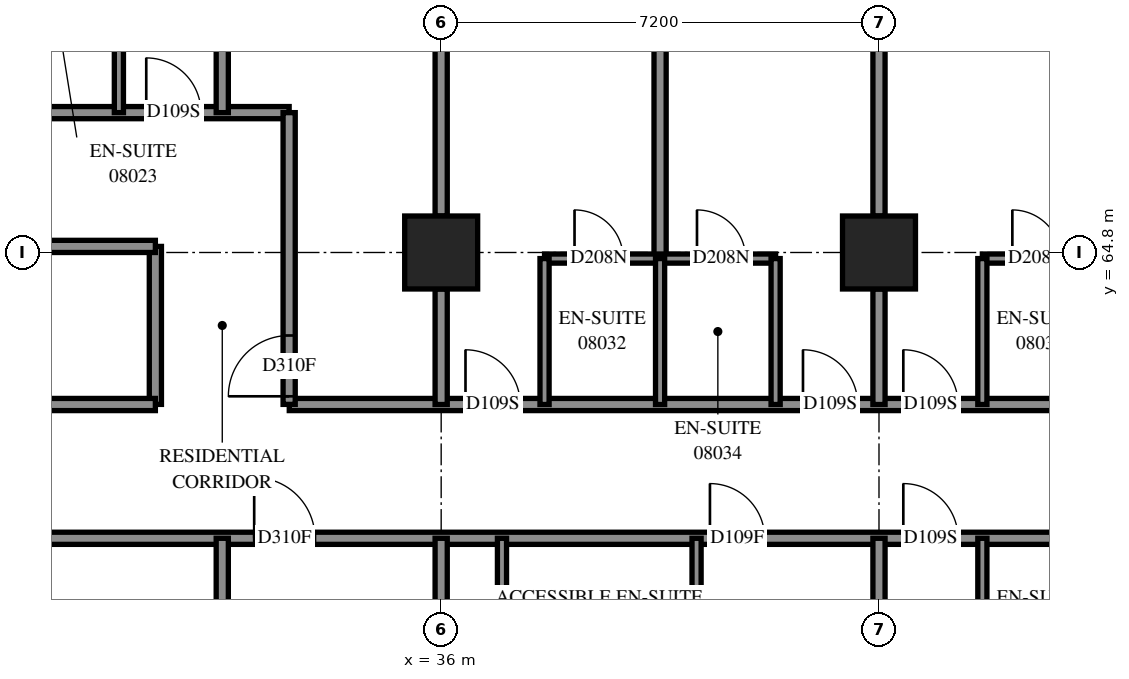
"""IFC4 building model, lengths in metres.
Left out: names, types, materials, properties, quantities, classifications, styles, units other than length and angle.
Written with IfcOpenShell. Run it as: python <this file> out.ifc"""

import sys

from ifc_helpers import new_model, si_unit, direction, frame, frame_2d, origin, origin_2d, place, context, subcontext, project, spatial, rectangle, extrude, element, fill, save


model = new_model("IFC4")
c1 = context("Model", 3, precision=1e-05, world=origin(), true_north=direction((0.0, 1.0)))
c2 = subcontext(c1, "Body", "Model", "MODEL_VIEW")
j1 = project(units=[si_unit("LENGTHUNIT", "METRE"), si_unit("PLANEANGLEUNIT", "RADIAN")], contexts=[c1])
p1 = place(None, origin())
s1 = spatial("IfcSite", under=j1, at=p1, CompositionType="ELEMENT")
p2 = place(p1, origin())
s2 = spatial("IfcBuilding", under=s1, at=p2, CompositionType="ELEMENT")
p3 = place(p2, frame((0.0, 0.0, 33.8)))
s3 = spatial("IfcBuildingStorey", under=s2, at=p3, CompositionType="ELEMENT", Elevation=33.8)
for number, where, z_axis, x_axis in (
    (1, (36.0, 64.8, 0.0), (0.0, 0.0, 1.0), (1.0, 0.0, 0.0)),
    (2, (43.2, 64.8, 0.0), (0.0, 0.0, 1.0), (1.0, 0.0, 0.0)),
):
    element("IfcColumn", number, at=place(p3, frame(where, z_axis=z_axis, x_axis=x_axis)), inside=s3, PredefinedType="COLUMN", context=c2, shape_type="SweptSolid", body=[
        extrude(rectangle(XDim=1.2, YDim=1.2, at=origin_2d()), origin(), (0.0, 0.0, 1.0), 3.1),
    ])
p4 = place(p3, frame((28.8, 60.1, 0.0), z_axis=(0.0, 0.0, 1.0), x_axis=(1.0, 0.0, 0.0)))
e3 = element("IfcWall", 3, at=p4, inside=s3, PredefinedType="PARTITIONING", context=c2, shape_type="SweptSolid", body=[
    extrude(rectangle(XDim=24.1, YDim=0.2, at=frame_2d((12.05, 0.0))), origin(), (0.0, 0.0, 1.0), 3.1),
])
p5 = place(p4, frame((4.125, 0.0, 0.0)))
e4 = element("IfcOpeningElement", 4, at=p5, cuts=e3, PredefinedType="OPENING", context=c2, shape_type="SweptSolid", body=[
    extrude(rectangle(XDim=1.0, YDim=2.1, at=frame_2d((0.5, 1.05))), frame((0.0, 0.11, 0.0), z_axis=(0.0, -1.0, 0.0), x_axis=(1.0, 0.0, 0.0)), (0.0, 0.0, 1.0), 0.22),
])
p6 = place(p4, frame((11.62, 0.0, 0.0)))
e5 = element("IfcOpeningElement", 5, at=p6, cuts=e3, PredefinedType="OPENING", context=c2, shape_type="SweptSolid", body=[
    extrude(rectangle(XDim=0.9, YDim=2.1, at=frame_2d((0.45, 1.05))), frame((0.0, 0.11, 0.0), z_axis=(0.0, -1.0, 0.0), x_axis=(1.0, 0.0, 0.0)), (0.0, 0.0, 1.0), 0.22),
])
p7 = place(p4, frame((14.8, 0.0, 0.0)))
e6 = element("IfcOpeningElement", 6, at=p7, cuts=e3, PredefinedType="OPENING", context=c2, shape_type="SweptSolid", body=[
    extrude(rectangle(XDim=0.9, YDim=2.1, at=frame_2d((0.45, 1.05))), frame((0.0, 0.11, 0.0), z_axis=(0.0, -1.0, 0.0), x_axis=(1.0, 0.0, 0.0)), (0.0, 0.0, 1.0), 0.22),
])
p8 = place(p4, frame((18.835, 0.0, 0.0)))
e7 = element("IfcOpeningElement", 7, at=p8, cuts=e3, PredefinedType="OPENING", context=c2, shape_type="SweptSolid", body=[
    extrude(rectangle(XDim=1.0, YDim=2.1, at=frame_2d((0.5, 1.05))), frame((0.0, 0.11, 0.0), z_axis=(0.0, -1.0, 0.0), x_axis=(1.0, 0.0, 0.0)), (0.0, 0.0, 1.0), 0.22),
])
p9 = place(p4, frame((22.854, 0.0, 0.0)))
e8 = element("IfcOpeningElement", 8, at=p9, cuts=e3, PredefinedType="OPENING", context=c2, shape_type="SweptSolid", body=[
    extrude(rectangle(XDim=1.0, YDim=2.1, at=frame_2d((0.5, 1.05))), frame((0.0, 0.11, 0.0), z_axis=(0.0, -1.0, 0.0), x_axis=(1.0, 0.0, 0.0)), (0.0, 0.0, 1.0), 0.22),
])
p10 = place(p3, frame((33.502, 62.3, 0.0), z_axis=(0.0, 0.0, 1.0), x_axis=(1.0, 0.0, 0.0)))
e9 = element("IfcWall", 9, at=p10, inside=s3, PredefinedType="PARTITIONING", context=c2, shape_type="SweptSolid", body=[
    extrude(rectangle(XDim=20.998, YDim=0.2, at=frame_2d((10.499, 0.0))), origin(), (0.0, 0.0, 1.0), 3.1),
])
p11 = place(p10, frame((2.898, 0.0, 0.0)))
e10 = element("IfcOpeningElement", 10, at=p11, cuts=e9, PredefinedType="OPENING", context=c2, shape_type="SweptSolid", body=[
    extrude(rectangle(XDim=0.9, YDim=2.1, at=frame_2d((0.45, 1.05))), frame((0.0, 0.11, 0.0), z_axis=(0.0, -1.0, 0.0), x_axis=(1.0, 0.0, 0.0)), (0.0, 0.0, 1.0), 0.22),
])
p12 = place(p10, frame((8.448, 0.0, 0.0)))
e11 = element("IfcOpeningElement", 11, at=p12, cuts=e9, PredefinedType="OPENING", context=c2, shape_type="SweptSolid", body=[
    extrude(rectangle(XDim=0.9, YDim=2.1, at=frame_2d((0.45, 1.05))), frame((0.0, 0.11, 0.0), z_axis=(0.0, -1.0, 0.0), x_axis=(1.0, 0.0, 0.0)), (0.0, 0.0, 1.0), 0.22),
])
p13 = place(p10, frame((10.098, 0.0, 0.0)))
e12 = element("IfcOpeningElement", 12, at=p13, cuts=e9, PredefinedType="OPENING", context=c2, shape_type="SweptSolid", body=[
    extrude(rectangle(XDim=0.9, YDim=2.1, at=frame_2d((0.45, 1.05))), frame((0.0, 0.11, 0.0), z_axis=(0.0, -1.0, 0.0), x_axis=(1.0, 0.0, 0.0)), (0.0, 0.0, 1.0), 0.22),
])
p14 = place(p10, frame((15.648, 0.0, 0.0)))
e13 = element("IfcOpeningElement", 13, at=p14, cuts=e9, PredefinedType="OPENING", context=c2, shape_type="SweptSolid", body=[
    extrude(rectangle(XDim=0.9, YDim=2.1, at=frame_2d((0.45, 1.05))), frame((0.0, 0.11, 0.0), z_axis=(0.0, -1.0, 0.0), x_axis=(1.0, 0.0, 0.0)), (0.0, 0.0, 1.0), 0.22),
])
p15 = place(p10, frame((17.298, 0.0, 0.0)))
e14 = element("IfcOpeningElement", 14, at=p15, cuts=e9, PredefinedType="OPENING", context=c2, shape_type="SweptSolid", body=[
    extrude(rectangle(XDim=0.9, YDim=2.1, at=frame_2d((0.45, 1.05))), frame((0.0, 0.11, 0.0), z_axis=(0.0, -1.0, 0.0), x_axis=(1.0, 0.0, 0.0)), (0.0, 0.0, 1.0), 0.22),
])
p16 = place(p3, frame((21.602, 67.1, 0.0), z_axis=(0.0, 0.0, 1.0), x_axis=(1.0, 0.0, 0.0)))
e15 = element("IfcWall", 15, at=p16, inside=s3, PredefinedType="PARTITIONING", context=c2, shape_type="SweptSolid", body=[
    extrude(rectangle(XDim=11.898, YDim=0.2, at=frame_2d((5.949, 0.0))), origin(), (0.0, 0.0, 1.0), 3.1),
])
p17 = place(p16, frame((1.798, 0.0, 0.0)))
e16 = element("IfcOpeningElement", 16, at=p17, cuts=e15, PredefinedType="OPENING", context=c2, shape_type="SweptSolid", body=[
    extrude(rectangle(XDim=1.0, YDim=2.1, at=frame_2d((0.5, 1.05))), frame((0.0, 0.11, 0.0), z_axis=(0.0, -1.0, 0.0), x_axis=(1.0, 0.0, 0.0)), (0.0, 0.0, 1.0), 0.22),
])
p18 = place(p16, frame((3.998, 0.0, 0.0)))
e17 = element("IfcOpeningElement", 17, at=p18, cuts=e15, PredefinedType="OPENING", context=c2, shape_type="SweptSolid", body=[
    extrude(rectangle(XDim=0.9, YDim=2.1, at=frame_2d((0.45, 1.05))), frame((0.0, 0.11, 0.0), z_axis=(0.0, -1.0, 0.0), x_axis=(1.0, 0.0, 0.0)), (0.0, 0.0, 1.0), 0.22),
])
p19 = place(p16, frame((9.548, 0.0, 0.0)))
e18 = element("IfcOpeningElement", 18, at=p19, cuts=e15, PredefinedType="OPENING", context=c2, shape_type="SweptSolid", body=[
    extrude(rectangle(XDim=0.9, YDim=2.1, at=frame_2d((0.45, 1.05))), frame((0.0, 0.11, 0.0), z_axis=(0.0, -1.0, 0.0), x_axis=(1.0, 0.0, 0.0)), (0.0, 0.0, 1.0), 0.22),
])
p20 = place(p3, frame((39.6, 64.7, 0.0), z_axis=(0.0, 0.0, 1.0), x_axis=(0.0, 1.0, 0.0)))
e19 = element("IfcWall", 19, at=p20, inside=s3, PredefinedType="PARTITIONING", context=c2, shape_type="SweptSolid", body=[
    extrude(rectangle(XDim=8.062, YDim=0.2, at=frame_2d((4.031, 0.0))), origin(), (0.0, 0.0, 1.0), 3.1),
])
for number, where, z_axis, x_axis in (
    (20, (36.0, 65.4, 0.0), (0.0, 0.0, 1.0), (0.0, 1.0, 0.0)),
    (21, (43.2, 65.4, 0.0), (0.0, 0.0, 1.0), (0.0, 1.0, 0.0)),
):
    element("IfcWall", number, at=place(p3, frame(where, z_axis=z_axis, x_axis=x_axis)), inside=s3, PredefinedType="PARTITIONING", context=c2, shape_type="SweptSolid", body=[
        extrude(rectangle(XDim=6.0, YDim=0.2, at=frame_2d((3.0, 0.0))), origin(), (0.0, 0.0, 1.0), 3.1),
    ])
p21 = place(p3, frame((32.4, 67.1, 0.0), z_axis=(0.0, 0.0, 1.0), x_axis=(0.0, 1.0, 0.0)))
e22 = element("IfcWall", 22, at=p21, inside=s3, PredefinedType="PARTITIONING", context=c2, shape_type="SweptSolid", body=[
    extrude(rectangle(XDim=5.699, YDim=0.2, at=frame_2d((2.849, 0.0))), origin(), (0.0, 0.0, 1.0), 3.1),
])
p22 = place(p3, frame((33.5, 62.302, 0.0), z_axis=(0.0, 0.0, 1.0), x_axis=(0.0, 1.0, 0.0)))
e23 = element("IfcWall", 23, at=p22, inside=s3, PredefinedType="PARTITIONING", context=c2, shape_type="SweptSolid", body=[
    extrude(rectangle(XDim=4.798, YDim=0.2, at=frame_2d((2.399, 0.0))), origin(), (0.0, 0.0, 1.0), 3.1),
])
p23 = place(p22, frame((0.133, 0.0, 0.0)))
e24 = element("IfcOpeningElement", 24, at=p23, cuts=e23, PredefinedType="OPENING", context=c2, shape_type="SweptSolid", body=[
    extrude(rectangle(XDim=1.0, YDim=2.1, at=frame_2d((0.5, 1.05))), frame((0.0, 0.11, 0.0), z_axis=(0.0, -1.0, 0.0), x_axis=(1.0, 0.0, 0.0)), (0.0, 0.0, 1.0), 0.22),
])
p24 = place(p3, frame((44.9, 64.7, 0.0), z_axis=(0.0, 0.0, 1.0), x_axis=(1.0, 0.0, 0.0)))
e25 = element("IfcWall", 25, at=p24, inside=s3, PredefinedType="PARTITIONING", context=c2, shape_type="SweptSolid", body=[
    extrude(rectangle(XDim=3.8, YDim=0.15, at=frame_2d((1.9, 0.0))), origin(), (0.0, 0.0, 1.0), 3.1),
])
p25 = place(p24, frame((0.493, 0.0, 0.0)))
e26 = element("IfcOpeningElement", 26, at=p25, cuts=e25, PredefinedType="OPENING", context=c2, shape_type="SweptSolid", body=[
    extrude(rectangle(XDim=0.8, YDim=2.1, at=frame_2d((0.4, 1.05))), frame((0.0, 0.085, 0.0), z_axis=(0.0, -1.0, 0.0), x_axis=(1.0, 0.0, 0.0)), (0.0, 0.0, 1.0), 0.17),
])
p26 = place(p24, frame((2.507, 0.0, 0.0)))
e27 = element("IfcOpeningElement", 27, at=p26, cuts=e25, PredefinedType="OPENING", context=c2, shape_type="SweptSolid", body=[
    extrude(rectangle(XDim=0.8, YDim=2.1, at=frame_2d((0.4, 1.05))), frame((0.0, 0.085, 0.0), z_axis=(0.0, -1.0, 0.0), x_axis=(1.0, 0.0, 0.0)), (0.0, 0.0, 1.0), 0.17),
])
p27 = place(p3, frame((37.7, 64.7, 0.0), z_axis=(0.0, 0.0, 1.0), x_axis=(1.0, 0.0, 0.0)))
e28 = element("IfcWall", 28, at=p27, inside=s3, PredefinedType="PARTITIONING", context=c2, shape_type="SweptSolid", body=[
    extrude(rectangle(XDim=3.8, YDim=0.15, at=frame_2d((1.9, 0.0))), origin(), (0.0, 0.0, 1.0), 3.1),
])
p28 = place(p27, frame((0.493, 0.0, 0.0)))
e29 = element("IfcOpeningElement", 29, at=p28, cuts=e28, PredefinedType="OPENING", context=c2, shape_type="SweptSolid", body=[
    extrude(rectangle(XDim=0.8, YDim=2.1, at=frame_2d((0.4, 1.05))), frame((0.0, 0.085, 0.0), z_axis=(0.0, -1.0, 0.0), x_axis=(1.0, 0.0, 0.0)), (0.0, 0.0, 1.0), 0.17),
])
p29 = place(p27, frame((2.507, 0.0, 0.0)))
e30 = element("IfcOpeningElement", 30, at=p29, cuts=e28, PredefinedType="OPENING", context=c2, shape_type="SweptSolid", body=[
    extrude(rectangle(XDim=0.8, YDim=2.1, at=frame_2d((0.4, 1.05))), frame((0.0, 0.085, 0.0), z_axis=(0.0, -1.0, 0.0), x_axis=(1.0, 0.0, 0.0)), (0.0, 0.0, 1.0), 0.17),
])
p30 = place(p3, frame((32.4, 56.95, 0.0), z_axis=(0.0, 0.0, 1.0), x_axis=(0.0, 1.0, 0.0)))
e31 = element("IfcWall", 31, at=p30, inside=s3, PredefinedType="PARTITIONING", context=c2, shape_type="SweptSolid", body=[
    extrude(rectangle(XDim=3.15, YDim=0.2, at=frame_2d((1.575, 0.0))), origin(), (0.0, 0.0, 1.0), 3.1),
])
p31 = place(p3, frame((31.3, 62.302, 0.0), z_axis=(0.0, 0.0, 1.0), x_axis=(0.0, 1.0, 0.0)))
e32 = element("IfcWall", 32, at=p31, inside=s3, PredefinedType="PARTITIONING", context=c2, shape_type="SweptSolid", body=[
    extrude(rectangle(XDim=2.598, YDim=0.2, at=frame_2d((1.299, 0.0))), origin(), (0.0, 0.0, 1.0), 3.1),
])
p32 = place(p3, frame((28.802, 62.3, 0.0), z_axis=(0.0, 0.0, 1.0), x_axis=(1.0, 0.0, 0.0)))
e33 = element("IfcWall", 33, at=p32, inside=s3, PredefinedType="PARTITIONING", context=c2, shape_type="SweptSolid", body=[
    extrude(rectangle(XDim=2.498, YDim=0.2, at=frame_2d((1.249, 0.0))), origin(), (0.0, 0.0, 1.0), 3.1),
])
for number, where, z_axis, x_axis in (
    (34, (30.7, 67.1, 0.0), (0.0, 0.0, 1.0), (0.0, 1.0, 0.0)),
    (35, (37.7, 62.3, 0.0), (0.0, 0.0, 1.0), (0.0, 1.0, 0.0)),
    (36, (39.6, 62.3, 0.0), (0.0, 0.0, 1.0), (0.0, 1.0, 0.0)),
    (37, (41.5, 62.3, 0.0), (0.0, 0.0, 1.0), (0.0, 1.0, 0.0)),
    (38, (44.9, 62.3, 0.0), (0.0, 0.0, 1.0), (0.0, 1.0, 0.0)),
    (39, (40.2, 57.7, 0.0), (0.0, 0.0, 1.0), (0.0, 1.0, 0.0)),
    (40, (37.0, 57.7, 0.0), (0.0, 0.0, 1.0), (0.0, 1.0, 0.0)),
    (41, (44.9, 57.7, 0.0), (0.0, 0.0, 1.0), (0.0, 1.0, 0.0)),
):
    element("IfcWall", number, at=place(p3, frame(where, z_axis=z_axis, x_axis=x_axis)), inside=s3, PredefinedType="PARTITIONING", context=c2, shape_type="SweptSolid", body=[
        extrude(rectangle(XDim=2.4, YDim=0.15, at=frame_2d((1.2, 0.0))), origin(), (0.0, 0.0, 1.0), 3.1),
    ])
for number, where, z_axis, x_axis in (
    (42, (36.0, 62.3, 0.0), (0.0, 0.0, 1.0), (0.0, 1.0, 0.0)),
    (43, (43.2, 62.3, 0.0), (0.0, 0.0, 1.0), (0.0, 1.0, 0.0)),
    (44, (29.4, 64.9, 0.0), (0.0, 0.0, 1.0), (1.0, 0.0, 0.0)),
    (45, (36.0, 58.2, 0.0), (0.0, 0.0, 1.0), (0.0, 1.0, 0.0)),
    (46, (43.2, 58.2, 0.0), (0.0, 0.0, 1.0), (0.0, 1.0, 0.0)),
):
    element("IfcWall", number, at=place(p3, frame(where, z_axis=z_axis, x_axis=x_axis)), inside=s3, PredefinedType="PARTITIONING", context=c2, shape_type="SweptSolid", body=[
        extrude(rectangle(XDim=1.9, YDim=0.2, at=frame_2d((0.95, 0.0))), origin(), (0.0, 0.0, 1.0), 3.1),
    ])
p33 = place(p19, origin())
e47 = element("IfcDoor", 47, at=p33, inside=s3, OperationType="SINGLE_SWING_RIGHT", PredefinedType="DOOR", context=c2, shape_type="SweptSolid", body=[
    extrude(rectangle(XDim=0.9, YDim=2.1, at=frame_2d((0.45, 1.05))), frame((0.0, 0.025, 0.0), z_axis=(0.0, -1.0, 0.0), x_axis=(1.0, 0.0, 0.0)), (0.0, 0.0, 1.0), 0.05),
])
fill(e18, e47)
p34 = place(p5, origin())
e48 = element("IfcDoor", 48, at=p34, inside=s3, OperationType="SINGLE_SWING_RIGHT", PredefinedType="DOOR", context=c2, shape_type="SweptSolid", body=[
    extrude(rectangle(XDim=1.0, YDim=2.1, at=frame_2d((0.5, 1.05))), frame((0.0, 0.025, 0.0), z_axis=(0.0, -1.0, 0.0), x_axis=(1.0, 0.0, 0.0)), (0.0, 0.0, 1.0), 0.05),
])
fill(e4, e48)
p35 = place(p6, origin())
e49 = element("IfcDoor", 49, at=p35, inside=s3, OperationType="SINGLE_SWING_LEFT", PredefinedType="DOOR", context=c2, shape_type="SweptSolid", body=[
    extrude(rectangle(XDim=0.9, YDim=2.1, at=frame_2d((0.45, 1.05))), frame((0.0, 0.025, 0.0), z_axis=(0.0, -1.0, 0.0), x_axis=(1.0, 0.0, 0.0)), (0.0, 0.0, 1.0), 0.05),
])
fill(e5, e49)
p36 = place(p7, origin())
e50 = element("IfcDoor", 50, at=p36, inside=s3, OperationType="SINGLE_SWING_LEFT", PredefinedType="DOOR", context=c2, shape_type="SweptSolid", body=[
    extrude(rectangle(XDim=0.9, YDim=2.1, at=frame_2d((0.45, 1.05))), frame((0.0, 0.025, 0.0), z_axis=(0.0, -1.0, 0.0), x_axis=(1.0, 0.0, 0.0)), (0.0, 0.0, 1.0), 0.05),
])
fill(e6, e50)
p37 = place(p23, origin())
e51 = element("IfcDoor", 51, at=p37, inside=s3, OperationType="SINGLE_SWING_LEFT", PredefinedType="DOOR", context=c2, shape_type="SweptSolid", body=[
    extrude(rectangle(XDim=1.0, YDim=2.1, at=frame_2d((0.5, 1.05))), frame((0.0, 0.025, 0.0), z_axis=(0.0, -1.0, 0.0), x_axis=(1.0, 0.0, 0.0)), (0.0, 0.0, 1.0), 0.05),
])
fill(e24, e51)
p38 = place(p11, origin())
e52 = element("IfcDoor", 52, at=p38, inside=s3, OperationType="SINGLE_SWING_RIGHT", PredefinedType="DOOR", context=c2, shape_type="SweptSolid", body=[
    extrude(rectangle(XDim=0.9, YDim=2.1, at=frame_2d((0.45, 1.05))), frame((0.0, 0.025, 0.0), z_axis=(0.0, -1.0, 0.0), x_axis=(1.0, 0.0, 0.0)), (0.0, 0.0, 1.0), 0.05),
])
fill(e10, e52)
p39 = place(p28, origin())
e53 = element("IfcDoor", 53, at=p39, inside=s3, OperationType="SINGLE_SWING_RIGHT", PredefinedType="DOOR", context=c2, shape_type="SweptSolid", body=[
    extrude(rectangle(XDim=0.8, YDim=2.1, at=frame_2d((0.4, 1.05))), frame((0.0, 0.025, 0.0), z_axis=(0.0, -1.0, 0.0), x_axis=(1.0, 0.0, 0.0)), (0.0, 0.0, 1.0), 0.05),
])
fill(e29, e53)
p40 = place(p12, origin())
e54 = element("IfcDoor", 54, at=p40, inside=s3, OperationType="SINGLE_SWING_LEFT", PredefinedType="DOOR", context=c2, shape_type="SweptSolid", body=[
    extrude(rectangle(XDim=0.9, YDim=2.1, at=frame_2d((0.45, 1.05))), frame((0.0, 0.025, 0.0), z_axis=(0.0, -1.0, 0.0), x_axis=(1.0, 0.0, 0.0)), (0.0, 0.0, 1.0), 0.05),
])
fill(e11, e54)
p41 = place(p29, origin())
e55 = element("IfcDoor", 55, at=p41, inside=s3, OperationType="SINGLE_SWING_RIGHT", PredefinedType="DOOR", context=c2, shape_type="SweptSolid", body=[
    extrude(rectangle(XDim=0.8, YDim=2.1, at=frame_2d((0.4, 1.05))), frame((0.0, 0.025, 0.0), z_axis=(0.0, -1.0, 0.0), x_axis=(1.0, 0.0, 0.0)), (0.0, 0.0, 1.0), 0.05),
])
fill(e30, e55)
p42 = place(p13, origin())
e56 = element("IfcDoor", 56, at=p42, inside=s3, OperationType="SINGLE_SWING_RIGHT", PredefinedType="DOOR", context=c2, shape_type="SweptSolid", body=[
    extrude(rectangle(XDim=0.9, YDim=2.1, at=frame_2d((0.45, 1.05))), frame((0.0, 0.025, 0.0), z_axis=(0.0, -1.0, 0.0), x_axis=(1.0, 0.0, 0.0)), (0.0, 0.0, 1.0), 0.05),
])
fill(e12, e56)
p43 = place(p25, origin())
e57 = element("IfcDoor", 57, at=p43, inside=s3, OperationType="SINGLE_SWING_RIGHT", PredefinedType="DOOR", context=c2, shape_type="SweptSolid", body=[
    extrude(rectangle(XDim=0.8, YDim=2.1, at=frame_2d((0.4, 1.05))), frame((0.0, 0.025, 0.0), z_axis=(0.0, -1.0, 0.0), x_axis=(1.0, 0.0, 0.0)), (0.0, 0.0, 1.0), 0.05),
])
fill(e26, e57)
save(model, sys.argv[1])
